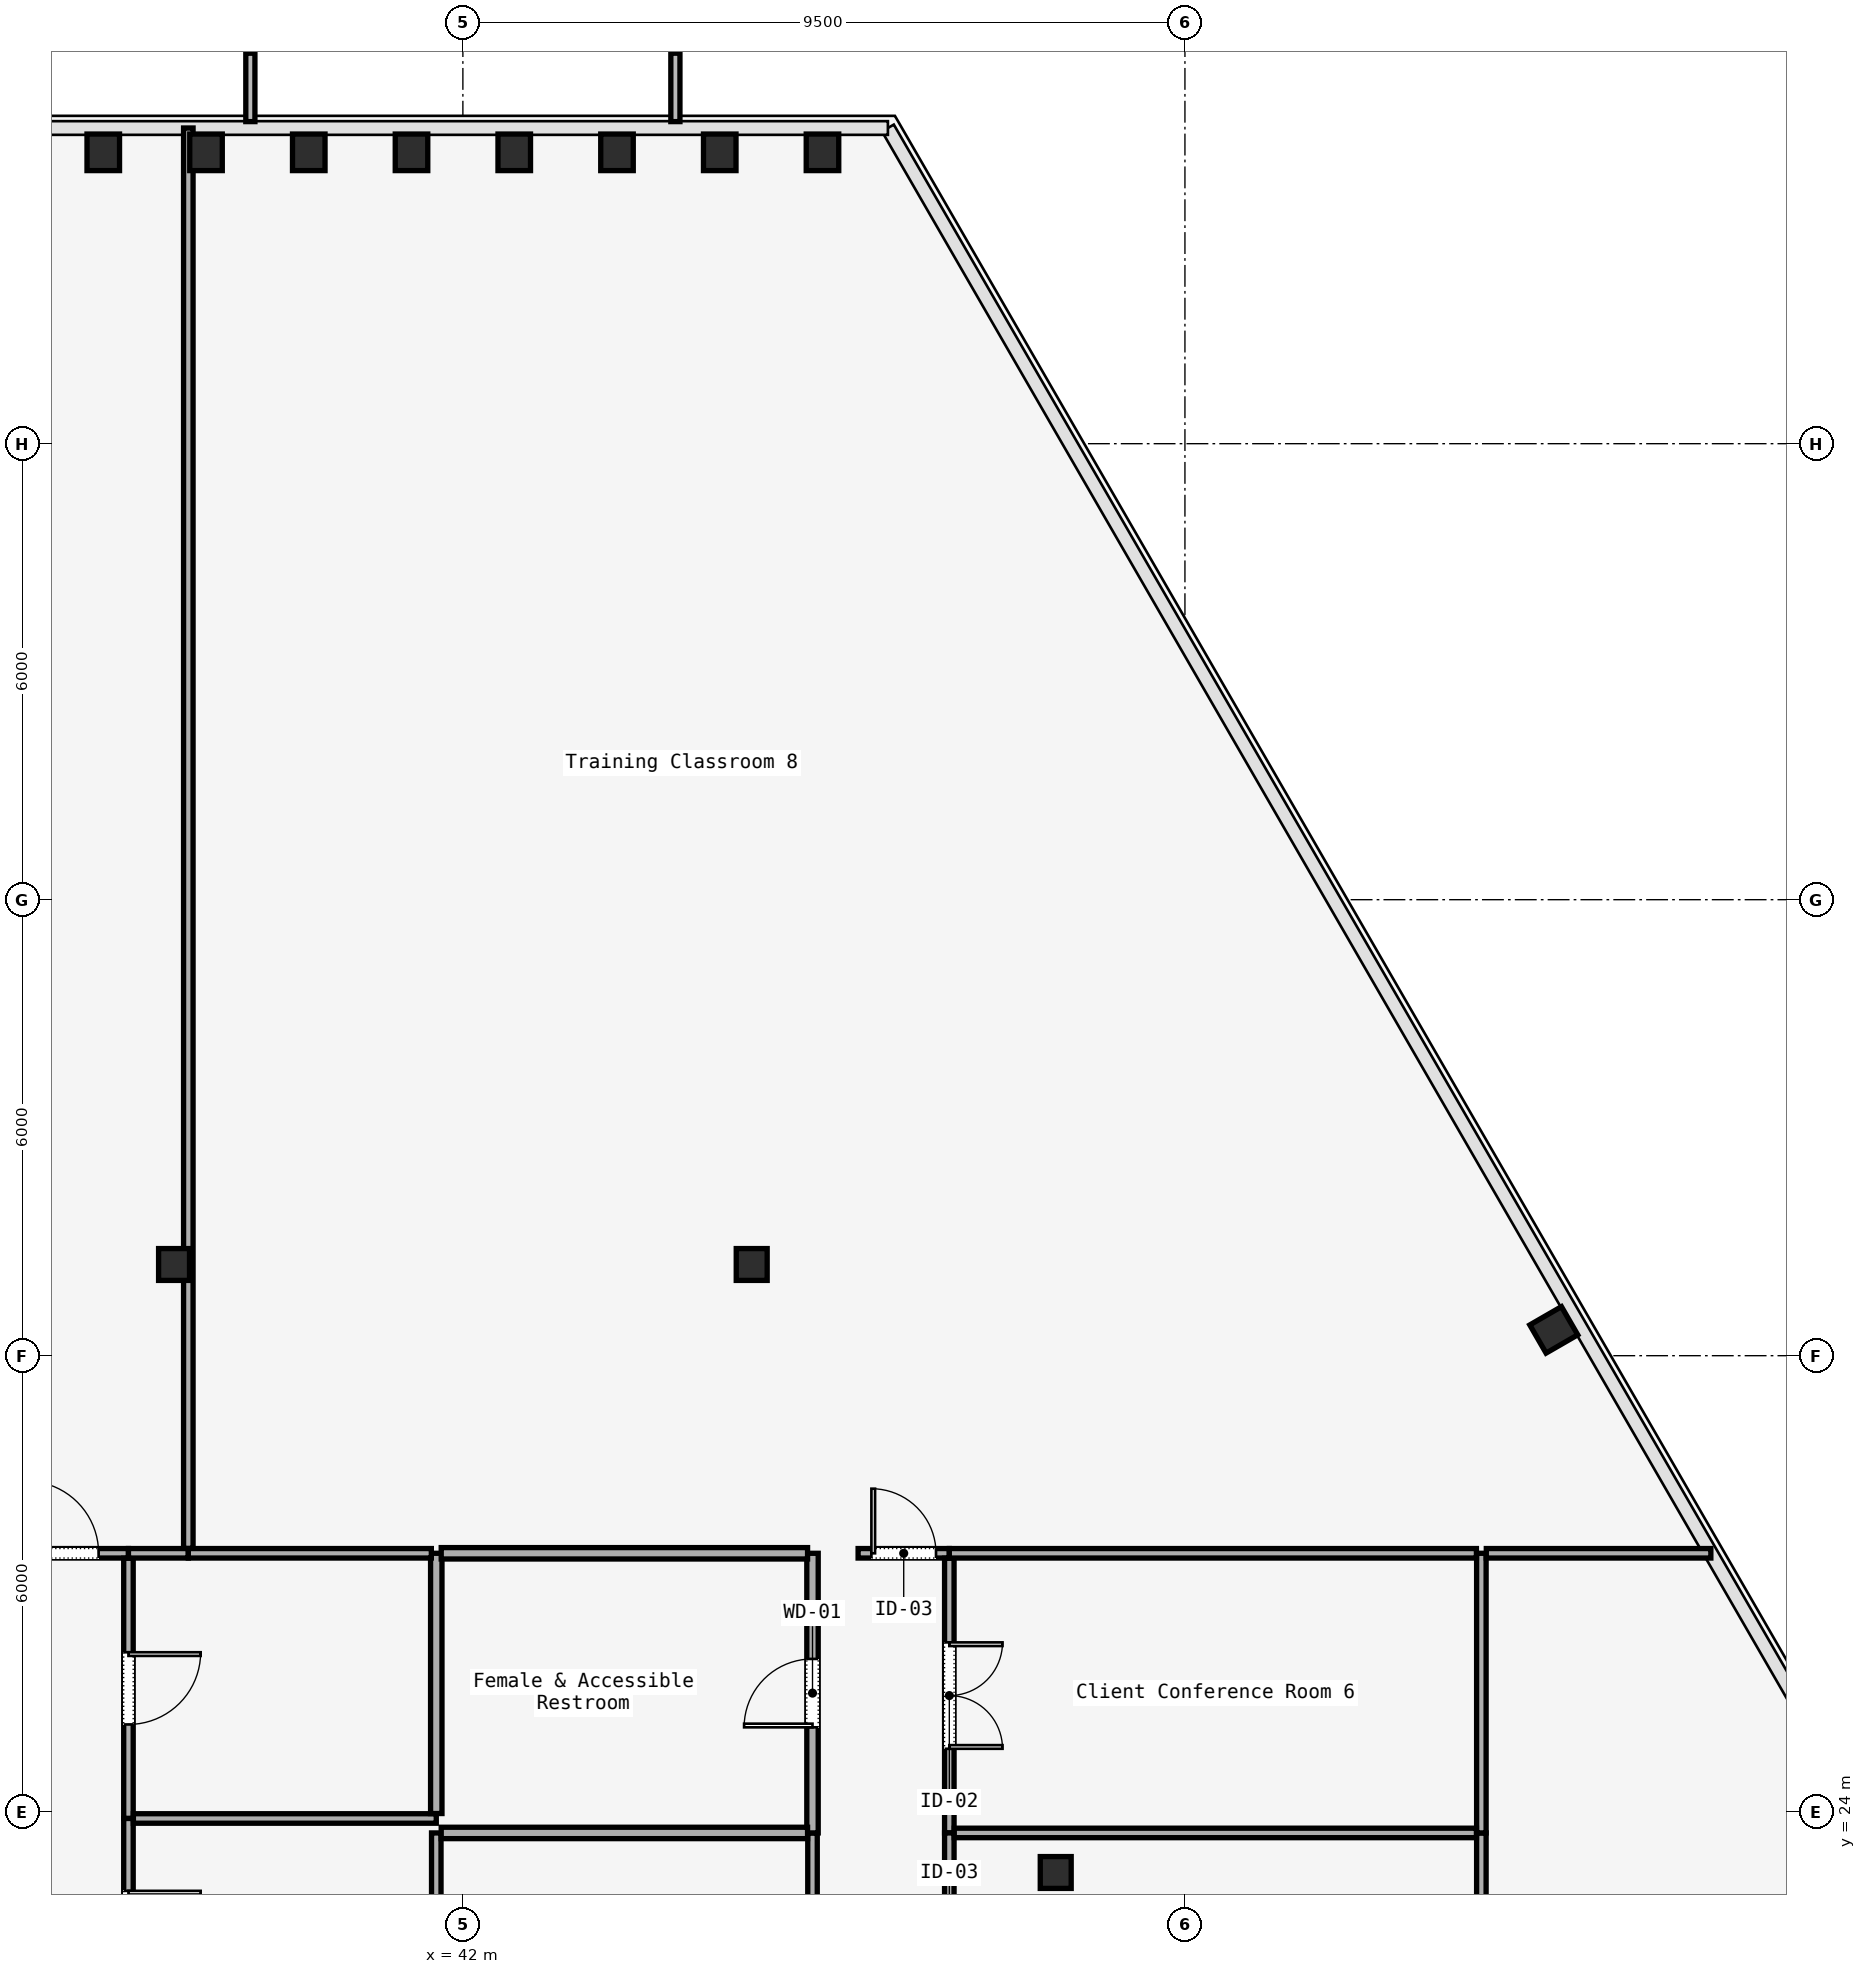
"""IFC4 building model, lengths in metres.
Left out: names, types, materials, properties, quantities, classifications, styles, units other than length and angle.
Written with IfcOpenShell. Run it as: python <this file> out.ifc"""

import sys

from ifc_helpers import new_model, si_unit, direction, frame, frame_2d, origin, origin_2d, place, context, subcontext, project, spatial, rectangle, i_section, extrude, element, fill, save


model = new_model("IFC4")
c1 = context("Model", 3, precision=1e-05, world=origin(), true_north=direction((0.0, 1.0)))
c2 = subcontext(c1, "Body", "Model", "MODEL_VIEW")
j1 = project(units=[si_unit("LENGTHUNIT", "METRE"), si_unit("PLANEANGLEUNIT", "RADIAN")], contexts=[c1])
p1 = place(None, origin())
s1 = spatial("IfcSite", under=j1, at=p1, CompositionType="ELEMENT")
p2 = place(p1, origin())
s2 = spatial("IfcBuilding", under=s1, at=p2, CompositionType="ELEMENT")
p3 = place(p2, frame((0.0, 0.0, 149.8)))
s3 = spatial("IfcBuildingStorey", under=s2, at=p3, CompositionType="ELEMENT", Elevation=149.8)
for number, where, z_axis, x_axis in (
    (1, (49.8, 23.2, 0.0), (0.0, 0.0, 1.0), (1.0, 0.0, 0.0)),
    (2, (38.2, 31.2, 0.0), (0.0, 0.0, 1.0), (1.0, 0.0, 0.0)),
    (3, (45.8, 31.2, 0.0), (0.0, 0.0, 1.0), (1.0, 0.0, 0.0)),
):
    element("IfcColumn", number, at=place(p3, frame(where, z_axis=z_axis, x_axis=x_axis)), inside=s3, PredefinedType="COLUMN", context=c2, shape_type="SweptSolid", body=[
        extrude(i_section(OverallWidth=0.407, OverallDepth=0.419, WebThickness=0.031, FlangeThickness=0.049, FilletRadius=0.015, at=origin_2d()), origin(), (0.0, 0.0, 1.0), 3.58),
    ])
for number, where, z_axis, x_axis in (
    (4, (56.353, 30.34, 0.0), (0.0, 0.0, 1.0), (-0.5, 0.866, 0.0)),
    (5, (46.731, 45.834, 0.0), (0.0, 0.0, 1.0), (1.0, 0.0, 0.0)),
    (6, (45.379, 45.834, 0.0), (0.0, 0.0, 1.0), (1.0, 0.0, 0.0)),
    (7, (44.028, 45.834, 0.0), (0.0, 0.0, 1.0), (1.0, 0.0, 0.0)),
    (8, (42.676, 45.834, 0.0), (0.0, 0.0, 1.0), (1.0, 0.0, 0.0)),
    (9, (41.324, 45.834, 0.0), (0.0, 0.0, 1.0), (1.0, 0.0, 0.0)),
    (10, (39.972, 45.834, 0.0), (0.0, 0.0, 1.0), (1.0, 0.0, 0.0)),
    (11, (38.621, 45.834, 0.0), (0.0, 0.0, 1.0), (1.0, 0.0, 0.0)),
    (12, (37.269, 45.834, 0.0), (0.0, 0.0, 1.0), (1.0, 0.0, 0.0)),
):
    element("IfcColumn", number, at=place(p3, frame(where, z_axis=z_axis, x_axis=x_axis)), inside=s3, PredefinedType="COLUMN", context=c2, shape_type="SweptSolid", body=[
        extrude(i_section(OverallWidth=0.428, OverallDepth=0.481, WebThickness=0.051, FlangeThickness=0.065, FilletRadius=0.015, at=origin_2d()), origin(), (0.0, 0.0, 1.0), 3.58),
    ])
p4 = place(p3, frame((35.865, 27.4, 0.0), z_axis=(0.0, 0.0, 1.0), x_axis=(1.0, 0.0, 0.0)))
e13 = element("IfcWall", 13, at=p4, inside=s3, PredefinedType="PARTITIONING", context=c2, shape_type="SweptSolid", body=[
    extrude(rectangle(XDim=1.735, YDim=0.125, at=frame_2d((0.868, 0.0))), origin(), (0.0, 0.0, 1.0), 3.01),
])
p5 = place(p4, frame((0.393, 0.0, 0.0)))
e14 = element("IfcOpeningElement", 14, at=p5, cuts=e13, PredefinedType="OPENING", context=c2, shape_type="SweptSolid", body=[
    extrude(rectangle(XDim=0.95, YDim=2.2, at=frame_2d((0.475, 1.1))), frame((0.0, 0.062, 0.0), z_axis=(0.0, -1.0, 0.0), x_axis=(1.0, 0.0, 0.0)), (0.0, 0.0, 1.0), 0.125),
])
p6 = place(p3, frame((37.6, 27.335, 0.0), z_axis=(0.0, 0.0, 1.0), x_axis=(0.0, -1.0, 0.0)))
e15 = element("IfcWall", 15, at=p6, inside=s3, PredefinedType="PARTITIONING", context=c2, shape_type="SweptSolid", body=[
    extrude(rectangle(XDim=3.424, YDim=0.125, at=frame_2d((1.712, 0.0))), origin(), (0.0, 0.0, 1.0), 3.01),
])
p7 = place(p6, frame((1.237, 0.0, 0.0)))
e16 = element("IfcOpeningElement", 16, at=p7, cuts=e15, PredefinedType="OPENING", context=c2, shape_type="SweptSolid", body=[
    extrude(rectangle(XDim=0.95, YDim=2.2, at=frame_2d((0.475, 1.1))), frame((0.0, 0.062, 0.0), z_axis=(0.0, -1.0, 0.0), x_axis=(1.0, 0.0, 0.0)), (0.0, 0.0, 1.0), 0.125),
])
p8 = place(p3, frame((37.6, 23.911, 0.0), z_axis=(0.0, 0.0, 1.0), x_axis=(0.0, -1.0, 0.0)))
e17 = element("IfcWall", 17, at=p8, inside=s3, PredefinedType="PARTITIONING", context=c2, shape_type="SweptSolid", body=[
    extrude(rectangle(XDim=2.855, YDim=0.125, at=frame_2d((1.427, 0.0))), origin(), (0.0, 0.0, 1.0), 3.01),
])
p9 = place(p8, frame((0.952, 0.0, 0.0)))
e18 = element("IfcOpeningElement", 18, at=p9, cuts=e17, PredefinedType="OPENING", context=c2, shape_type="SweptSolid", body=[
    extrude(rectangle(XDim=0.95, YDim=2.2, at=frame_2d((0.475, 1.1))), frame((0.0, 0.062, 0.0), z_axis=(0.0, -1.0, 0.0), x_axis=(1.0, 0.0, 0.0)), (0.0, 0.0, 1.0), 0.125),
])
p10 = place(p3, frame((46.6, 21.056, 0.0), z_axis=(0.0, 0.0, 1.0), x_axis=(0.0, 1.0, 0.0)))
e19 = element("IfcWall", 19, at=p10, inside=s3, PredefinedType="PARTITIONING", context=c2, shape_type="SweptSolid", body=[
    extrude(rectangle(XDim=2.665, YDim=0.125, at=frame_2d((1.332, 0.0))), origin(), (0.0, 0.0, 1.0), 3.01),
])
p11 = place(p10, frame((0.857, 0.0, 0.0)))
e20 = element("IfcOpeningElement", 20, at=p11, cuts=e19, PredefinedType="OPENING", context=c2, shape_type="SweptSolid", body=[
    extrude(rectangle(XDim=0.95, YDim=2.2, at=frame_2d((0.475, 1.1))), frame((0.0, 0.062, 0.0), z_axis=(0.0, -1.0, 0.0), x_axis=(1.0, 0.0, 0.0)), (0.0, 0.0, 1.0), 0.125),
])
p12 = place(p3, frame((46.6, 23.72, 0.0), z_axis=(0.0, 0.0, 1.0), x_axis=(0.0, 1.0, 0.0)))
e21 = element("IfcWall", 21, at=p12, inside=s3, PredefinedType="PARTITIONING", context=c2, shape_type="SweptSolid", body=[
    extrude(rectangle(XDim=3.679, YDim=0.15, at=frame_2d((1.84, 0.0))), origin(), (0.0, 0.0, 1.0), 3.01),
])
p13 = place(p12, frame((1.39, 0.0, 0.0)))
e22 = element("IfcOpeningElement", 22, at=p13, cuts=e21, PredefinedType="OPENING", context=c2, shape_type="SweptSolid", body=[
    extrude(rectangle(XDim=0.9, YDim=2.15, at=frame_2d((0.45, 1.075))), frame((0.0, 0.075, 0.0), z_axis=(0.0, -1.0, 0.0), x_axis=(1.0, 0.0, 0.0)), (0.0, 0.0, 1.0), 0.15),
])
p14 = place(p3, frame((47.2, 27.4, 0.0), z_axis=(0.0, 0.0, 1.0), x_axis=(1.0, 0.0, 0.0)))
e23 = element("IfcWall", 23, at=p14, inside=s3, PredefinedType="PARTITIONING", context=c2, shape_type="SweptSolid", body=[
    extrude(rectangle(XDim=1.2, YDim=0.125, at=frame_2d((0.6, 0.0))), origin(), (0.0, 0.0, 1.0), 3.01),
])
p15 = place(p14, frame((0.175, 0.0, 0.0)))
e24 = element("IfcOpeningElement", 24, at=p15, cuts=e23, PredefinedType="OPENING", context=c2, shape_type="SweptSolid", body=[
    extrude(rectangle(XDim=0.85, YDim=2.15, at=frame_2d((0.425, 1.075))), frame((0.0, 0.062, 0.0), z_axis=(0.0, -1.0, 0.0), x_axis=(1.0, 0.0, 0.0)), (0.0, 0.0, 1.0), 0.125),
])
p16 = place(p3, frame((48.4, 27.335, 0.0), z_axis=(0.0, 0.0, 1.0), x_axis=(0.0, -1.0, 0.0)))
e25 = element("IfcWall", 25, at=p16, inside=s3, PredefinedType="PARTITIONING", context=c2, shape_type="SweptSolid", body=[
    extrude(rectangle(XDim=3.615, YDim=0.125, at=frame_2d((1.807, 0.0))), origin(), (0.0, 0.0, 1.0), 3.01),
])
p17 = place(p16, frame((1.107, 0.0, 0.0)))
e26 = element("IfcOpeningElement", 26, at=p17, cuts=e25, PredefinedType="OPENING", context=c2, shape_type="SweptSolid", body=[
    extrude(rectangle(XDim=1.4, YDim=2.2, at=frame_2d((0.7, 1.1))), frame((0.0, 0.062, 0.0), z_axis=(0.0, -1.0, 0.0), x_axis=(1.0, 0.0, 0.0)), (0.0, 0.0, 1.0), 0.125),
])
p18 = place(p3, frame((48.4, 23.72, 0.0), z_axis=(0.0, 0.0, 1.0), x_axis=(0.0, -1.0, 0.0)))
e27 = element("IfcWall", 27, at=p18, inside=s3, PredefinedType="PARTITIONING", context=c2, shape_type="SweptSolid", body=[
    extrude(rectangle(XDim=2.353, YDim=0.125, at=frame_2d((1.176, 0.0))), origin(), (0.0, 0.0, 1.0), 3.01),
])
p19 = place(p18, frame((1.151, 0.0, 0.0)))
e28 = element("IfcOpeningElement", 28, at=p19, cuts=e27, PredefinedType="OPENING", context=c2, shape_type="SweptSolid", body=[
    extrude(rectangle(XDim=0.85, YDim=2.15, at=frame_2d((0.425, 1.075))), frame((0.0, 0.062, 0.0), z_axis=(0.0, -1.0, 0.0), x_axis=(1.0, 0.0, 0.0)), (0.0, 0.0, 1.0), 0.125),
])
p20 = place(p3, frame((55.4, 21.368, 0.0), z_axis=(0.0, 0.0, 1.0), x_axis=(0.0, 1.0, 0.0)))
e29 = element("IfcWall", 29, at=p20, inside=s3, PredefinedType="PARTITIONING", context=c2, shape_type="SweptSolid", body=[
    extrude(rectangle(XDim=2.353, YDim=0.125, at=frame_2d((1.176, 0.0))), origin(), (0.0, 0.0, 1.0), 3.01),
])
p21 = place(p3, frame((55.4, 23.72, 0.0), z_axis=(0.0, 0.0, 1.0), x_axis=(0.0, 1.0, 0.0)))
e30 = element("IfcWall", 30, at=p21, inside=s3, PredefinedType="PARTITIONING", context=c2, shape_type="SweptSolid", body=[
    extrude(rectangle(XDim=3.679, YDim=0.125, at=frame_2d((1.84, 0.0))), origin(), (0.0, 0.0, 1.0), 3.01),
])
p22 = place(p3, frame((55.465, 27.4, 0.0), z_axis=(0.0, 0.0, 1.0), x_axis=(1.0, 0.0, 0.0)))
e31 = element("IfcWall", 31, at=p22, inside=s3, PredefinedType="PARTITIONING", context=c2, shape_type="SweptSolid", body=[
    extrude(rectangle(XDim=2.954, YDim=0.125, at=frame_2d((1.477, 0.0))), origin(), (0.0, 0.0, 1.0), 3.01),
])
p23 = place(p3, frame((41.65, 21.121, 0.0), z_axis=(0.0, 0.0, 1.0), x_axis=(0.0, 1.0, 0.0)))
e32 = element("IfcWall", 32, at=p23, inside=s3, PredefinedType="PARTITIONING", context=c2, shape_type="SweptSolid", body=[
    extrude(rectangle(XDim=2.599, YDim=0.125, at=frame_2d((1.3, 0.0))), origin(), (0.0, 0.0, 1.0), 3.01),
])
p24 = place(p3, frame((41.715, 23.72, 0.0), z_axis=(0.0, 0.0, 1.0), x_axis=(1.0, 0.0, 0.0)))
e33 = element("IfcWall", 33, at=p24, inside=s3, PredefinedType="PARTITIONING", context=c2, shape_type="SweptSolid", body=[
    extrude(rectangle(XDim=4.82, YDim=0.15, at=frame_2d((2.41, 0.0))), origin(), (0.0, 0.0, 1.0), 3.01),
])
p25 = place(p3, frame((37.665, 23.911, 0.0), z_axis=(0.0, 0.0, 1.0), x_axis=(1.0, 0.0, 0.0)))
e34 = element("IfcWall", 34, at=p25, inside=s3, PredefinedType="PARTITIONING", context=c2, shape_type="SweptSolid", body=[
    extrude(rectangle(XDim=3.985, YDim=0.125, at=frame_2d((1.992, 0.0))), origin(), (0.0, 0.0, 1.0), 3.01),
])
p26 = place(p3, frame((48.465, 23.72, 0.0), z_axis=(0.0, 0.0, 1.0), x_axis=(1.0, 0.0, 0.0)))
e35 = element("IfcWall", 35, at=p26, inside=s3, PredefinedType="PARTITIONING", context=c2, shape_type="SweptSolid", body=[
    extrude(rectangle(XDim=6.87, YDim=0.125, at=frame_2d((3.435, 0.0))), origin(), (0.0, 0.0, 1.0), 3.01),
])
p27 = place(p3, frame((41.65, 23.976, 0.0), z_axis=(0.0, 0.0, 1.0), x_axis=(0.0, 1.0, 0.0)))
e36 = element("IfcWall", 36, at=p27, inside=s3, PredefinedType="PARTITIONING", context=c2, shape_type="SweptSolid", body=[
    extrude(rectangle(XDim=3.424, YDim=0.15, at=frame_2d((1.712, 0.0))), origin(), (0.0, 0.0, 1.0), 3.01),
])
p28 = place(p3, frame((41.715, 27.4, 0.0), z_axis=(0.0, 0.0, 1.0), x_axis=(1.0, 0.0, 0.0)))
e37 = element("IfcWall", 37, at=p28, inside=s3, PredefinedType="PARTITIONING", context=c2, shape_type="SweptSolid", body=[
    extrude(rectangle(XDim=4.82, YDim=0.15, at=frame_2d((2.41, 0.0))), origin(), (0.0, 0.0, 1.0), 3.01),
])
p29 = place(p3, frame((48.4, 27.4, 0.0), z_axis=(0.0, 0.0, 1.0), x_axis=(1.0, 0.0, 0.0)))
e38 = element("IfcWall", 38, at=p29, inside=s3, PredefinedType="PARTITIONING", context=c2, shape_type="SweptSolid", body=[
    extrude(rectangle(XDim=6.935, YDim=0.125, at=frame_2d((3.468, 0.0))), origin(), (0.0, 0.0, 1.0), 3.01),
])
p30 = place(p3, frame((37.6, 27.4, 0.0), z_axis=(0.0, 0.0, 1.0), x_axis=(1.0, 0.0, 0.0)))
e39 = element("IfcWall", 39, at=p30, inside=s3, PredefinedType="PARTITIONING", context=c2, shape_type="SweptSolid", body=[
    extrude(rectangle(XDim=0.788, YDim=0.125, at=frame_2d((0.394, 0.0))), origin(), (0.0, 0.0, 1.0), 3.01),
])
p31 = place(p3, frame((38.388, 27.4, 0.0), z_axis=(0.0, 0.0, 1.0), x_axis=(1.0, 0.0, 0.0)))
e40 = element("IfcWall", 40, at=p31, inside=s3, PredefinedType="PARTITIONING", context=c2, shape_type="SweptSolid", body=[
    extrude(rectangle(XDim=3.197, YDim=0.125, at=frame_2d((1.599, 0.0))), origin(), (0.0, 0.0, 1.0), 3.01),
])
p32 = place(p3, frame((38.388, 46.154, 0.0), z_axis=(0.0, 0.0, 1.0), x_axis=(0.0, -1.0, 0.0)))
e41 = element("IfcWall", 41, at=p32, inside=s3, PredefinedType="PARTITIONING", context=c2, shape_type="SweptSolid", body=[
    extrude(rectangle(XDim=18.689, YDim=0.125, at=frame_2d((9.344, 0.0))), origin(), (0.0, 0.0, 1.0), 3.01),
])
p33 = place(p9, origin())
e42 = element("IfcDoor", 42, at=p33, inside=s3, OperationType="SINGLE_SWING_RIGHT", PredefinedType="DOOR", context=c2, shape_type="SweptSolid", body=[
    extrude(rectangle(XDim=0.95, YDim=2.2, at=frame_2d((0.475, 1.1))), frame((0.0, 0.025, 0.0), z_axis=(0.0, -1.0, 0.0), x_axis=(1.0, 0.0, 0.0)), (0.0, 0.0, 1.0), 0.05),
])
fill(e18, e42)
p34 = place(p13, origin())
e43 = element("IfcDoor", 43, at=p34, inside=s3, OperationType="SINGLE_SWING_LEFT", PredefinedType="DOOR", context=c2, shape_type="SweptSolid", body=[
    extrude(rectangle(XDim=0.9, YDim=2.15, at=frame_2d((0.45, 1.075))), frame((0.0, 0.025, 0.0), z_axis=(0.0, -1.0, 0.0), x_axis=(1.0, 0.0, 0.0)), (0.0, 0.0, 1.0), 0.05),
])
fill(e22, e43)
p35 = place(p17, origin())
e44 = element("IfcDoor", 44, at=p35, inside=s3, OperationType="SINGLE_SWING_RIGHT", PredefinedType="DOOR", context=c2, shape_type="SweptSolid", body=[
    extrude(rectangle(XDim=1.4, YDim=2.2, at=frame_2d((0.7, 1.1))), frame((0.0, 0.025, 0.0), z_axis=(0.0, -1.0, 0.0), x_axis=(1.0, 0.0, 0.0)), (0.0, 0.0, 1.0), 0.05),
])
fill(e26, e44)
p36 = place(p7, origin())
e45 = element("IfcDoor", 45, at=p36, inside=s3, OperationType="SINGLE_SWING_LEFT", PredefinedType="DOOR", context=c2, shape_type="SweptSolid", body=[
    extrude(rectangle(XDim=0.95, YDim=2.2, at=frame_2d((0.475, 1.1))), frame((0.0, 0.025, 0.0), z_axis=(0.0, -1.0, 0.0), x_axis=(1.0, 0.0, 0.0)), (0.0, 0.0, 1.0), 0.05),
])
fill(e16, e45)
p37 = place(p5, origin())
e46 = element("IfcDoor", 46, at=p37, inside=s3, OperationType="SINGLE_SWING_LEFT", PredefinedType="DOOR", context=c2, shape_type="SweptSolid", body=[
    extrude(rectangle(XDim=0.95, YDim=2.2, at=frame_2d((0.475, 1.1))), frame((0.0, 0.025, 0.0), z_axis=(0.0, -1.0, 0.0), x_axis=(1.0, 0.0, 0.0)), (0.0, 0.0, 1.0), 0.05),
])
fill(e14, e46)
p38 = place(p15, origin())
e47 = element("IfcDoor", 47, at=p38, inside=s3, OperationType="SINGLE_SWING_LEFT", PredefinedType="DOOR", context=c2, shape_type="SweptSolid", body=[
    extrude(rectangle(XDim=0.85, YDim=2.15, at=frame_2d((0.425, 1.075))), frame((0.0, 0.025, 0.0), z_axis=(0.0, -1.0, 0.0), x_axis=(1.0, 0.0, 0.0)), (0.0, 0.0, 1.0), 0.05),
])
fill(e24, e47)
save(model, sys.argv[1])
